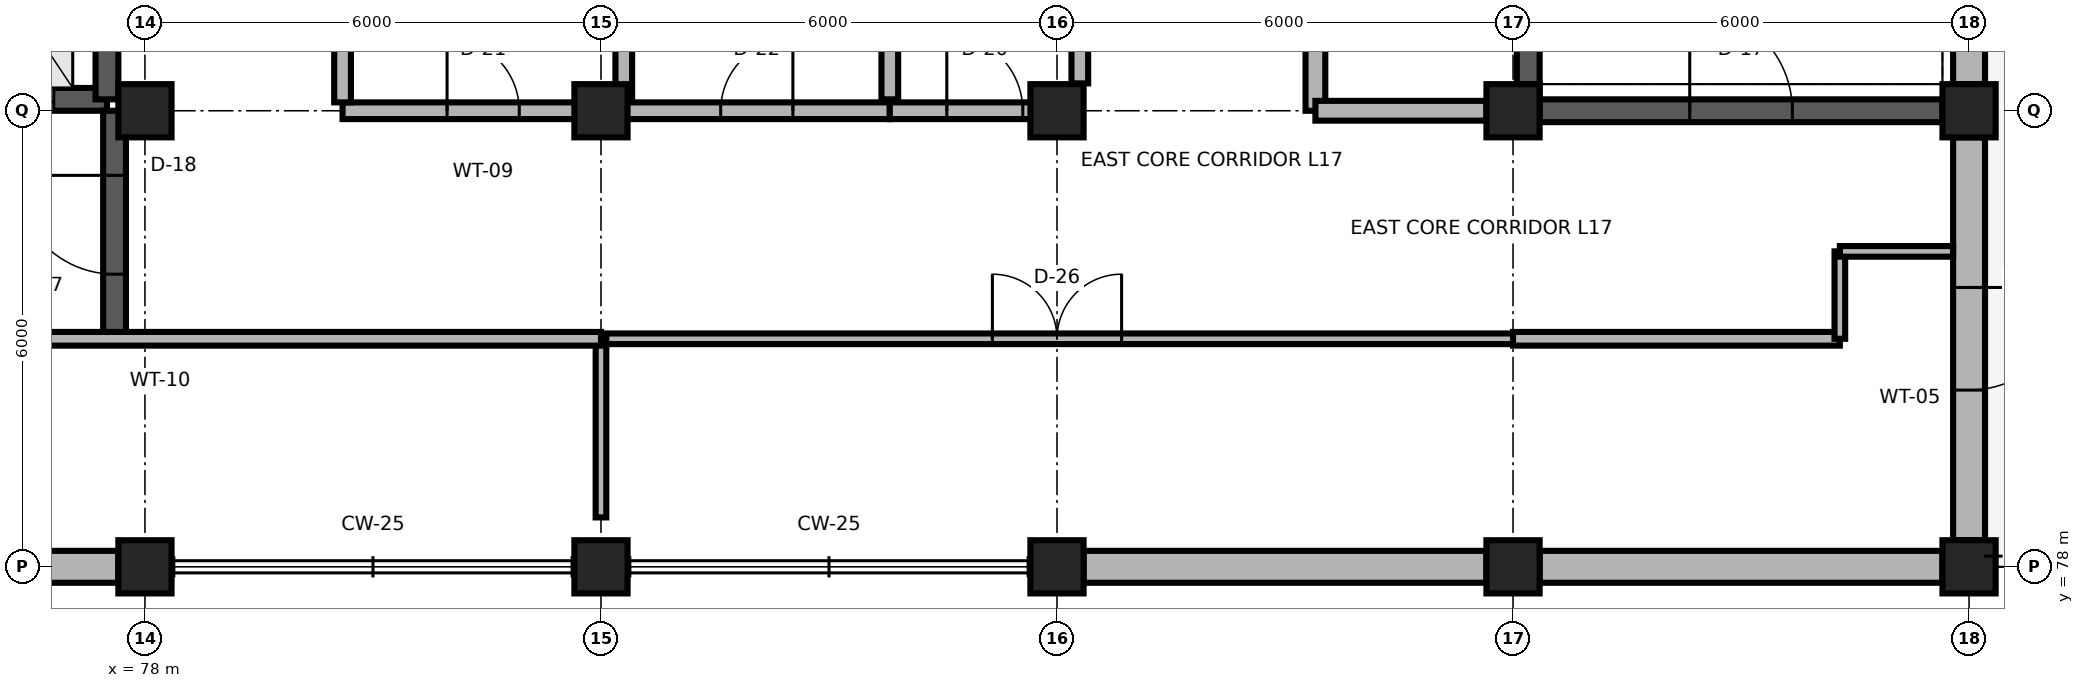
"""IFC4 building model, lengths in metres.
Left out: names, types, materials, properties, quantities, classifications, styles, units other than length and angle.
Written with IfcOpenShell. Run it as: python <this file> out.ifc"""

import sys

from ifc_helpers import new_model, si_unit, direction, frame, frame_2d, origin, origin_2d, place, context, subcontext, project, spatial, rectangle, extrude, element, fill, save


model = new_model("IFC4")
c1 = context("Model", 3, precision=1e-05, world=origin(), true_north=direction((0.0, 1.0)))
c2 = subcontext(c1, "Body", "Model", "MODEL_VIEW")
j1 = project(units=[si_unit("LENGTHUNIT", "METRE"), si_unit("PLANEANGLEUNIT", "RADIAN")], contexts=[c1])
p1 = place(None, origin())
s1 = spatial("IfcSite", under=j1, at=p1, CompositionType="ELEMENT")
p2 = place(p1, origin())
s2 = spatial("IfcBuilding", under=s1, at=p2, CompositionType="ELEMENT")
p3 = place(p2, frame((0.0, 0.0, 67.8)))
s3 = spatial("IfcBuildingStorey", under=s2, at=p3, CompositionType="ELEMENT", Elevation=67.8)
for number, where, z_axis, x_axis in (
    (1, (78.0, 78.0, 0.0), (0.0, 0.0, 1.0), (1.0, 0.0, 0.0)),
    (2, (84.0, 78.0, 0.0), (0.0, 0.0, 1.0), (1.0, 0.0, 0.0)),
    (3, (90.0, 78.0, 0.0), (0.0, 0.0, 1.0), (1.0, 0.0, 0.0)),
    (4, (96.0, 78.0, 0.0), (0.0, 0.0, 1.0), (1.0, 0.0, 0.0)),
    (5, (102.0, 78.0, 0.0), (0.0, 0.0, 1.0), (1.0, 0.0, 0.0)),
    (6, (78.0, 84.0, 0.0), (0.0, 0.0, 1.0), (1.0, 0.0, 0.0)),
    (7, (84.0, 84.0, 0.0), (0.0, 0.0, 1.0), (1.0, 0.0, 0.0)),
    (8, (90.0, 84.0, 0.0), (0.0, 0.0, 1.0), (1.0, 0.0, 0.0)),
    (9, (96.0, 84.0, 0.0), (0.0, 0.0, 1.0), (1.0, 0.0, 0.0)),
    (10, (102.0, 84.0, 0.0), (0.0, 0.0, 1.0), (1.0, 0.0, 0.0)),
):
    element("IfcColumn", number, at=place(p3, frame(where, z_axis=z_axis, x_axis=x_axis)), inside=s3, PredefinedType="COLUMN", context=c2, shape_type="SweptSolid", body=[
        extrude(rectangle(XDim=0.7, YDim=0.7, at=origin_2d()), origin(), (0.0, 0.0, 1.0), 4.2),
    ])
for number, where, z_axis, x_axis in (
    (11, (72.35, 78.0, 0.0), (0.0, 0.0, 1.0), (1.0, 0.0, 0.0)),
    (12, (90.35, 78.0, 0.0), (0.0, 0.0, 1.0), (1.0, 0.0, 0.0)),
    (13, (96.35, 78.0, 0.0), (0.0, 0.0, 1.0), (1.0, 0.0, 0.0)),
):
    element("IfcWall", number, at=place(p3, frame(where, z_axis=z_axis, x_axis=x_axis)), inside=s3, PredefinedType="SOLIDWALL", context=c2, shape_type="SweptSolid", body=[
        extrude(rectangle(XDim=5.3, YDim=0.42, at=frame_2d((2.65, 0.0))), origin(), (0.0, 0.0, 1.0), 3.54),
    ])
p4 = place(p3, frame((102.0, 78.35, 0.0), z_axis=(0.0, 0.0, 1.0), x_axis=(0.0, 1.0, 0.0)))
e14 = element("IfcWall", 14, at=p4, inside=s3, PredefinedType="SOLIDWALL", context=c2, shape_type="SweptSolid", body=[
    extrude(rectangle(XDim=5.3, YDim=0.42, at=frame_2d((2.65, 0.0))), origin(), (0.0, 0.0, 1.0), 3.54),
])
p5 = place(p4, frame((1.975, 0.0, 0.0)))
e15 = element("IfcOpeningElement", 15, at=p5, cuts=e14, PredefinedType="OPENING", context=c2, shape_type="SweptSolid", body=[
    extrude(rectangle(XDim=1.35, YDim=2.35, at=frame_2d((0.675, 1.175))), frame((0.0, 0.225, 0.0), z_axis=(0.0, -1.0, 0.0), x_axis=(1.0, 0.0, 0.0)), (0.0, 0.0, 1.0), 0.45),
])
p6 = place(p3, frame((102.0, 84.35, 0.0), z_axis=(0.0, 0.0, 1.0), x_axis=(0.0, 1.0, 0.0)))
e16 = element("IfcWall", 16, at=p6, inside=s3, PredefinedType="SOLIDWALL", context=c2, shape_type="SweptSolid", body=[
    extrude(rectangle(XDim=5.3, YDim=0.42, at=frame_2d((2.65, 0.0))), origin(), (0.0, 0.0, 1.0), 3.54),
])
p7 = place(p3, frame((96.35, 84.0, 0.0), z_axis=(0.0, 0.0, 1.0), x_axis=(1.0, 0.0, 0.0)))
e17 = element("IfcWall", 17, at=p7, inside=s3, PredefinedType="SHEAR", context=c2, shape_type="SweptSolid", body=[
    extrude(rectangle(XDim=5.3, YDim=0.3, at=frame_2d((2.65, 0.0))), origin(), (0.0, 0.0, 1.0), 3.96),
])
p8 = place(p7, frame((1.975, 0.0, 0.0)))
e18 = element("IfcOpeningElement", 18, at=p8, cuts=e17, PredefinedType="OPENING", context=c2, shape_type="SweptSolid", body=[
    extrude(rectangle(XDim=1.35, YDim=2.2, at=frame_2d((0.675, 1.1))), frame((0.0, 0.165, 0.0), z_axis=(0.0, -1.0, 0.0), x_axis=(1.0, 0.0, 0.0)), (0.0, 0.0, 1.0), 0.33),
])
p9 = place(p3, frame((96.2, 84.0, 0.0), z_axis=(0.0, 0.0, 1.0), x_axis=(0.0, 1.0, 0.0)))
e19 = element("IfcWall", 19, at=p9, inside=s3, PredefinedType="SHEAR", context=c2, shape_type="SweptSolid", body=[
    extrude(rectangle(XDim=11.8, YDim=0.3, at=frame_2d((5.9, 0.0))), origin(), (0.0, 0.0, 1.0), 3.96),
])
p10 = place(p3, frame((75.0, 84.15, 0.0), z_axis=(0.0, 0.0, 1.0), x_axis=(1.0, 0.0, 0.0)))
e20 = element("IfcWall", 20, at=p10, inside=s3, PredefinedType="SHEAR", context=c2, shape_type="SweptSolid", body=[
    extrude(rectangle(XDim=2.5, YDim=0.3, at=frame_2d((1.25, 0.0))), origin(), (0.0, 0.0, 1.0), 3.96),
])
p11 = place(p10, frame((0.7, 0.0, 0.0)))
e21 = element("IfcOpeningElement", 21, at=p11, cuts=e20, PredefinedType="OPENING", context=c2, shape_type="SweptSolid", body=[
    extrude(rectangle(XDim=1.1, YDim=2.1, at=frame_2d((0.55, 1.05))), frame((0.0, 0.165, 0.0), z_axis=(0.0, -1.0, 0.0), x_axis=(1.0, 0.0, 0.0)), (0.0, 0.0, 1.0), 0.33),
])
p12 = place(p3, frame((77.5, 84.15, 0.0), z_axis=(0.0, 0.0, 1.0), x_axis=(0.0, 1.0, 0.0)))
e22 = element("IfcWall", 22, at=p12, inside=s3, PredefinedType="SHEAR", context=c2, shape_type="SweptSolid", body=[
    extrude(rectangle(XDim=3.4, YDim=0.3, at=frame_2d((1.7, 0.0))), origin(), (0.0, 0.0, 1.0), 3.96),
])
p13 = place(p3, frame((93.4, 84.0, 0.0), z_axis=(0.0, 0.0, 1.0), x_axis=(0.0, 1.0, 0.0)))
e23 = element("IfcWall", 23, at=p13, inside=s3, PredefinedType="PARTITIONING", context=c2, shape_type="SweptSolid", body=[
    extrude(rectangle(XDim=11.96, YDim=0.26, at=frame_2d((5.98, 0.0))), origin(), (0.0, 0.0, 1.0), 3.96),
])
p14 = place(p13, frame((3.425, 0.0, 0.0)))
e24 = element("IfcOpeningElement", 24, at=p14, cuts=e23, PredefinedType="OPENING", context=c2, shape_type="SweptSolid", body=[
    extrude(rectangle(XDim=1.15, YDim=2.2, at=frame_2d((0.575, 1.1))), frame((0.0, 0.145, 0.0), z_axis=(0.0, -1.0, 0.0), x_axis=(1.0, 0.0, 0.0)), (0.0, 0.0, 1.0), 0.29),
])
p15 = place(p3, frame((93.4, 84.0, 0.0), z_axis=(0.0, 0.0, 1.0), x_axis=(1.0, 0.0, 0.0)))
e25 = element("IfcWall", 25, at=p15, inside=s3, PredefinedType="PARTITIONING", context=c2, shape_type="SweptSolid", body=[
    extrude(rectangle(XDim=2.25, YDim=0.26, at=frame_2d((1.125, 0.0))), origin(), (0.0, 0.0, 1.0), 3.716),
])
p16 = place(p3, frame((77.6, 81.0, 0.0), z_axis=(0.0, 0.0, 1.0), x_axis=(0.0, 1.0, 0.0)))
e26 = element("IfcWall", 26, at=p16, inside=s3, PredefinedType="SHEAR", context=c2, shape_type="SweptSolid", body=[
    extrude(rectangle(XDim=3.0, YDim=0.3, at=frame_2d((1.5, 0.0))), origin(), (0.0, 0.0, 1.0), 3.96),
])
p17 = place(p16, frame((0.85, 0.0, 0.0)))
e27 = element("IfcOpeningElement", 27, at=p17, cuts=e26, PredefinedType="OPENING", context=c2, shape_type="SweptSolid", body=[
    extrude(rectangle(XDim=1.3, YDim=2.2, at=frame_2d((0.65, 1.1))), frame((0.0, 0.165, 0.0), z_axis=(0.0, -1.0, 0.0), x_axis=(1.0, 0.0, 0.0)), (0.0, 0.0, 1.0), 0.33),
])
p18 = place(p3, frame((80.6, 84.0, 0.0), z_axis=(0.0, 0.0, 1.0), x_axis=(1.0, 0.0, 0.0)))
e28 = element("IfcWall", 28, at=p18, inside=s3, PredefinedType="PARTITIONING", context=c2, shape_type="SweptSolid", body=[
    extrude(rectangle(XDim=3.7, YDim=0.22, at=frame_2d((1.85, 0.0))), origin(), (0.0, 0.0, 1.0), 3.716),
])
p19 = place(p18, frame((1.375, 0.0, 0.0)))
e29 = element("IfcOpeningElement", 29, at=p19, cuts=e28, PredefinedType="OPENING", context=c2, shape_type="SweptSolid", body=[
    extrude(rectangle(XDim=0.95, YDim=2.15, at=frame_2d((0.475, 1.075))), frame((0.0, 0.125, 0.0), z_axis=(0.0, -1.0, 0.0), x_axis=(1.0, 0.0, 0.0)), (0.0, 0.0, 1.0), 0.25),
])
p20 = place(p3, frame((84.3, 84.0, 0.0), z_axis=(0.0, 0.0, 1.0), x_axis=(1.0, 0.0, 0.0)))
e30 = element("IfcWall", 30, at=p20, inside=s3, PredefinedType="PARTITIONING", context=c2, shape_type="SweptSolid", body=[
    extrude(rectangle(XDim=3.5, YDim=0.22, at=frame_2d((1.75, 0.0))), origin(), (0.0, 0.0, 1.0), 3.716),
])
p21 = place(p20, frame((1.275, 0.0, 0.0)))
e31 = element("IfcOpeningElement", 31, at=p21, cuts=e30, PredefinedType="OPENING", context=c2, shape_type="SweptSolid", body=[
    extrude(rectangle(XDim=0.95, YDim=2.1, at=frame_2d((0.475, 1.05))), frame((0.0, 0.125, 0.0), z_axis=(0.0, -1.0, 0.0), x_axis=(1.0, 0.0, 0.0)), (0.0, 0.0, 1.0), 0.25),
])
p22 = place(p3, frame((87.8, 84.0, 0.0), z_axis=(0.0, 0.0, 1.0), x_axis=(1.0, 0.0, 0.0)))
e32 = element("IfcWall", 32, at=p22, inside=s3, PredefinedType="PARTITIONING", context=c2, shape_type="SweptSolid", body=[
    extrude(rectangle(XDim=2.5, YDim=0.22, at=frame_2d((1.25, 0.0))), origin(), (0.0, 0.0, 1.0), 3.716),
])
p23 = place(p22, frame((0.75, 0.0, 0.0)))
e33 = element("IfcOpeningElement", 33, at=p23, cuts=e32, PredefinedType="OPENING", context=c2, shape_type="SweptSolid", body=[
    extrude(rectangle(XDim=1.0, YDim=2.15, at=frame_2d((0.5, 1.075))), frame((0.0, 0.125, 0.0), z_axis=(0.0, -1.0, 0.0), x_axis=(1.0, 0.0, 0.0)), (0.0, 0.0, 1.0), 0.25),
])
for number, where, z_axis, x_axis in (
    (34, (84.3, 84.15, 0.0), (0.0, 0.0, 1.0), (0.0, 1.0, 0.0)),
    (35, (87.8, 84.15, 0.0), (0.0, 0.0, 1.0), (0.0, 1.0, 0.0)),
):
    element("IfcWall", number, at=place(p3, frame(where, z_axis=z_axis, x_axis=x_axis)), inside=s3, PredefinedType="PARTITIONING", context=c2, shape_type="SweptSolid", body=[
        extrude(rectangle(XDim=5.0, YDim=0.22, at=frame_2d((2.5, 0.0))), origin(), (0.0, 0.0, 1.0), 3.96),
    ])
p24 = place(p3, frame((84.0, 81.0, 0.0), z_axis=(0.0, 0.0, 1.0), x_axis=(1.0, 0.0, 0.0)))
e36 = element("IfcWall", 36, at=p24, inside=s3, PredefinedType="PARTITIONING", context=c2, shape_type="SweptSolid", body=[
    extrude(rectangle(XDim=12.0, YDim=0.14, at=frame_2d((6.0, 0.0))), origin(), (0.0, 0.0, 1.0), 3.96),
])
p25 = place(p24, frame((5.15, 0.0, 0.0)))
e37 = element("IfcOpeningElement", 37, at=p25, cuts=e36, PredefinedType="OPENING", context=c2, shape_type="SweptSolid", body=[
    extrude(rectangle(XDim=1.7, YDim=2.45, at=frame_2d((0.85, 1.225))), frame((0.0, 0.085, 0.0), z_axis=(0.0, -1.0, 0.0), x_axis=(1.0, 0.0, 0.0)), (0.0, 0.0, 1.0), 0.17),
])
p26 = place(p3, frame((84.0, 78.65, 0.0), z_axis=(0.0, 0.0, 1.0), x_axis=(0.0, 1.0, 0.0)))
e38 = element("IfcWall", 38, at=p26, inside=s3, PredefinedType="PARTITIONING", context=c2, shape_type="SweptSolid", body=[
    extrude(rectangle(XDim=2.35, YDim=0.14, at=frame_2d((1.175, 0.0))), origin(), (0.0, 0.0, 1.0), 3.716),
])
p27 = place(p3, frame((80.6, 84.11, 0.0), z_axis=(0.0, 0.0, 1.0), x_axis=(0.0, 1.0, 0.0)))
e39 = element("IfcWall", 39, at=p27, inside=s3, PredefinedType="PARTITIONING", context=c2, shape_type="SweptSolid", body=[
    extrude(rectangle(XDim=4.98, YDim=0.22, at=frame_2d((2.49, 0.0))), origin(), (0.0, 0.0, 1.0), 3.96),
])
p28 = place(p3, frame((90.3, 84.36, 0.0), z_axis=(0.0, 0.0, 1.0), x_axis=(0.0, 1.0, 0.0)))
e40 = element("IfcWall", 40, at=p28, inside=s3, PredefinedType="PARTITIONING", context=c2, shape_type="SweptSolid", body=[
    extrude(rectangle(XDim=4.73, YDim=0.22, at=frame_2d((2.365, 0.0))), origin(), (0.0, 0.0, 1.0), 3.96),
])
p29 = place(p3, frame((72.4, 81.0, 0.0), z_axis=(0.0, 0.0, 1.0), x_axis=(1.0, 0.0, 0.0)))
e41 = element("IfcWall", 41, at=p29, inside=s3, PredefinedType="PARTITIONING", context=c2, shape_type="SweptSolid", body=[
    extrude(rectangle(XDim=11.6, YDim=0.18, at=frame_2d((5.8, 0.0))), origin(), (0.0, 0.0, 1.0), 3.96),
])
p30 = place(p3, frame((96.0, 81.0, 0.0), z_axis=(0.0, 0.0, 1.0), x_axis=(1.0, 0.0, 0.0)))
e42 = element("IfcWall", 42, at=p30, inside=s3, PredefinedType="PARTITIONING", context=c2, shape_type="SweptSolid", body=[
    extrude(rectangle(XDim=4.3, YDim=0.18, at=frame_2d((2.15, 0.0))), origin(), (0.0, 0.0, 1.0), 3.96),
])
p31 = place(p3, frame((100.3, 81.0, 0.0), z_axis=(0.0, 0.0, 1.0), x_axis=(0.0, 1.0, 0.0)))
e43 = element("IfcWall", 43, at=p31, inside=s3, PredefinedType="PARTITIONING", context=c2, shape_type="SweptSolid", body=[
    extrude(rectangle(XDim=1.15, YDim=0.14, at=frame_2d((0.575, 0.0))), origin(), (0.0, 0.0, 1.0), 3.96),
])
p32 = place(p3, frame((100.3, 82.15, 0.0), z_axis=(0.0, 0.0, 1.0), x_axis=(1.0, 0.0, 0.0)))
e44 = element("IfcWall", 44, at=p32, inside=s3, PredefinedType="PARTITIONING", context=c2, shape_type="SweptSolid", body=[
    extrude(rectangle(XDim=1.49, YDim=0.14, at=frame_2d((0.745, 0.0))), origin(), (0.0, 0.0, 1.0), 3.96),
])
p33 = place(p5, origin())
e45 = element("IfcDoor", 45, at=p33, inside=s3, OperationType="SINGLE_SWING_RIGHT", PredefinedType="DOOR", context=c2, shape_type="SweptSolid", body=[
    extrude(rectangle(XDim=1.35, YDim=2.35, at=frame_2d((0.675, 1.175))), frame((0.0, 0.025, 0.0), z_axis=(0.0, -1.0, 0.0), x_axis=(1.0, 0.0, 0.0)), (0.0, 0.0, 1.0), 0.05),
])
fill(e15, e45)
p34 = place(p8, origin())
e46 = element("IfcDoor", 46, at=p34, inside=s3, OperationType="SINGLE_SWING_LEFT", PredefinedType="DOOR", context=c2, shape_type="SweptSolid", body=[
    extrude(rectangle(XDim=1.35, YDim=2.2, at=frame_2d((0.675, 1.1))), frame((0.0, 0.025, 0.0), z_axis=(0.0, -1.0, 0.0), x_axis=(1.0, 0.0, 0.0)), (0.0, 0.0, 1.0), 0.05),
])
fill(e18, e46)
p35 = place(p11, origin())
e47 = element("IfcDoor", 47, at=p35, inside=s3, OperationType="DOUBLE_DOOR_SLIDING", PredefinedType="DOOR", context=c2, shape_type="SweptSolid", body=[
    extrude(rectangle(XDim=1.1, YDim=2.1, at=frame_2d((0.55, 1.05))), frame((0.0, 0.025, 0.0), z_axis=(0.0, -1.0, 0.0), x_axis=(1.0, 0.0, 0.0)), (0.0, 0.0, 1.0), 0.05),
])
fill(e21, e47)
p36 = place(p17, origin())
e48 = element("IfcDoor", 48, at=p36, inside=s3, OperationType="SINGLE_SWING_RIGHT", PredefinedType="DOOR", context=c2, shape_type="SweptSolid", body=[
    extrude(rectangle(XDim=1.3, YDim=2.2, at=frame_2d((0.65, 1.1))), frame((0.0, 0.025, 0.0), z_axis=(0.0, -1.0, 0.0), x_axis=(1.0, 0.0, 0.0)), (0.0, 0.0, 1.0), 0.05),
])
fill(e27, e48)
p37 = place(p19, origin())
e49 = element("IfcDoor", 49, at=p37, inside=s3, OperationType="SINGLE_SWING_LEFT", PredefinedType="DOOR", context=c2, shape_type="SweptSolid", body=[
    extrude(rectangle(XDim=0.95, YDim=2.15, at=frame_2d((0.475, 1.075))), frame((0.0, 0.025, 0.0), z_axis=(0.0, -1.0, 0.0), x_axis=(1.0, 0.0, 0.0)), (0.0, 0.0, 1.0), 0.05),
])
fill(e29, e49)
p38 = place(p21, origin())
e50 = element("IfcDoor", 50, at=p38, inside=s3, OperationType="SINGLE_SWING_RIGHT", PredefinedType="DOOR", context=c2, shape_type="SweptSolid", body=[
    extrude(rectangle(XDim=0.95, YDim=2.1, at=frame_2d((0.475, 1.05))), frame((0.0, 0.025, 0.0), z_axis=(0.0, -1.0, 0.0), x_axis=(1.0, 0.0, 0.0)), (0.0, 0.0, 1.0), 0.05),
])
fill(e31, e50)
p39 = place(p23, origin())
e51 = element("IfcDoor", 51, at=p39, inside=s3, OperationType="SINGLE_SWING_LEFT", PredefinedType="DOOR", context=c2, shape_type="SweptSolid", body=[
    extrude(rectangle(XDim=1.0, YDim=2.15, at=frame_2d((0.5, 1.075))), frame((0.0, 0.025, 0.0), z_axis=(0.0, -1.0, 0.0), x_axis=(1.0, 0.0, 0.0)), (0.0, 0.0, 1.0), 0.05),
])
fill(e33, e51)
p40 = place(p25, origin())
e52 = element("IfcDoor", 52, at=p40, inside=s3, OperationType="DOUBLE_DOOR_SINGLE_SWING", PredefinedType="DOOR", context=c2, shape_type="SweptSolid", body=[
    extrude(rectangle(XDim=1.7, YDim=2.45, at=frame_2d((0.85, 1.225))), frame((0.0, 0.025, 0.0), z_axis=(0.0, -1.0, 0.0), x_axis=(1.0, 0.0, 0.0)), (0.0, 0.0, 1.0), 0.05),
])
fill(e37, e52)
save(model, sys.argv[1])
